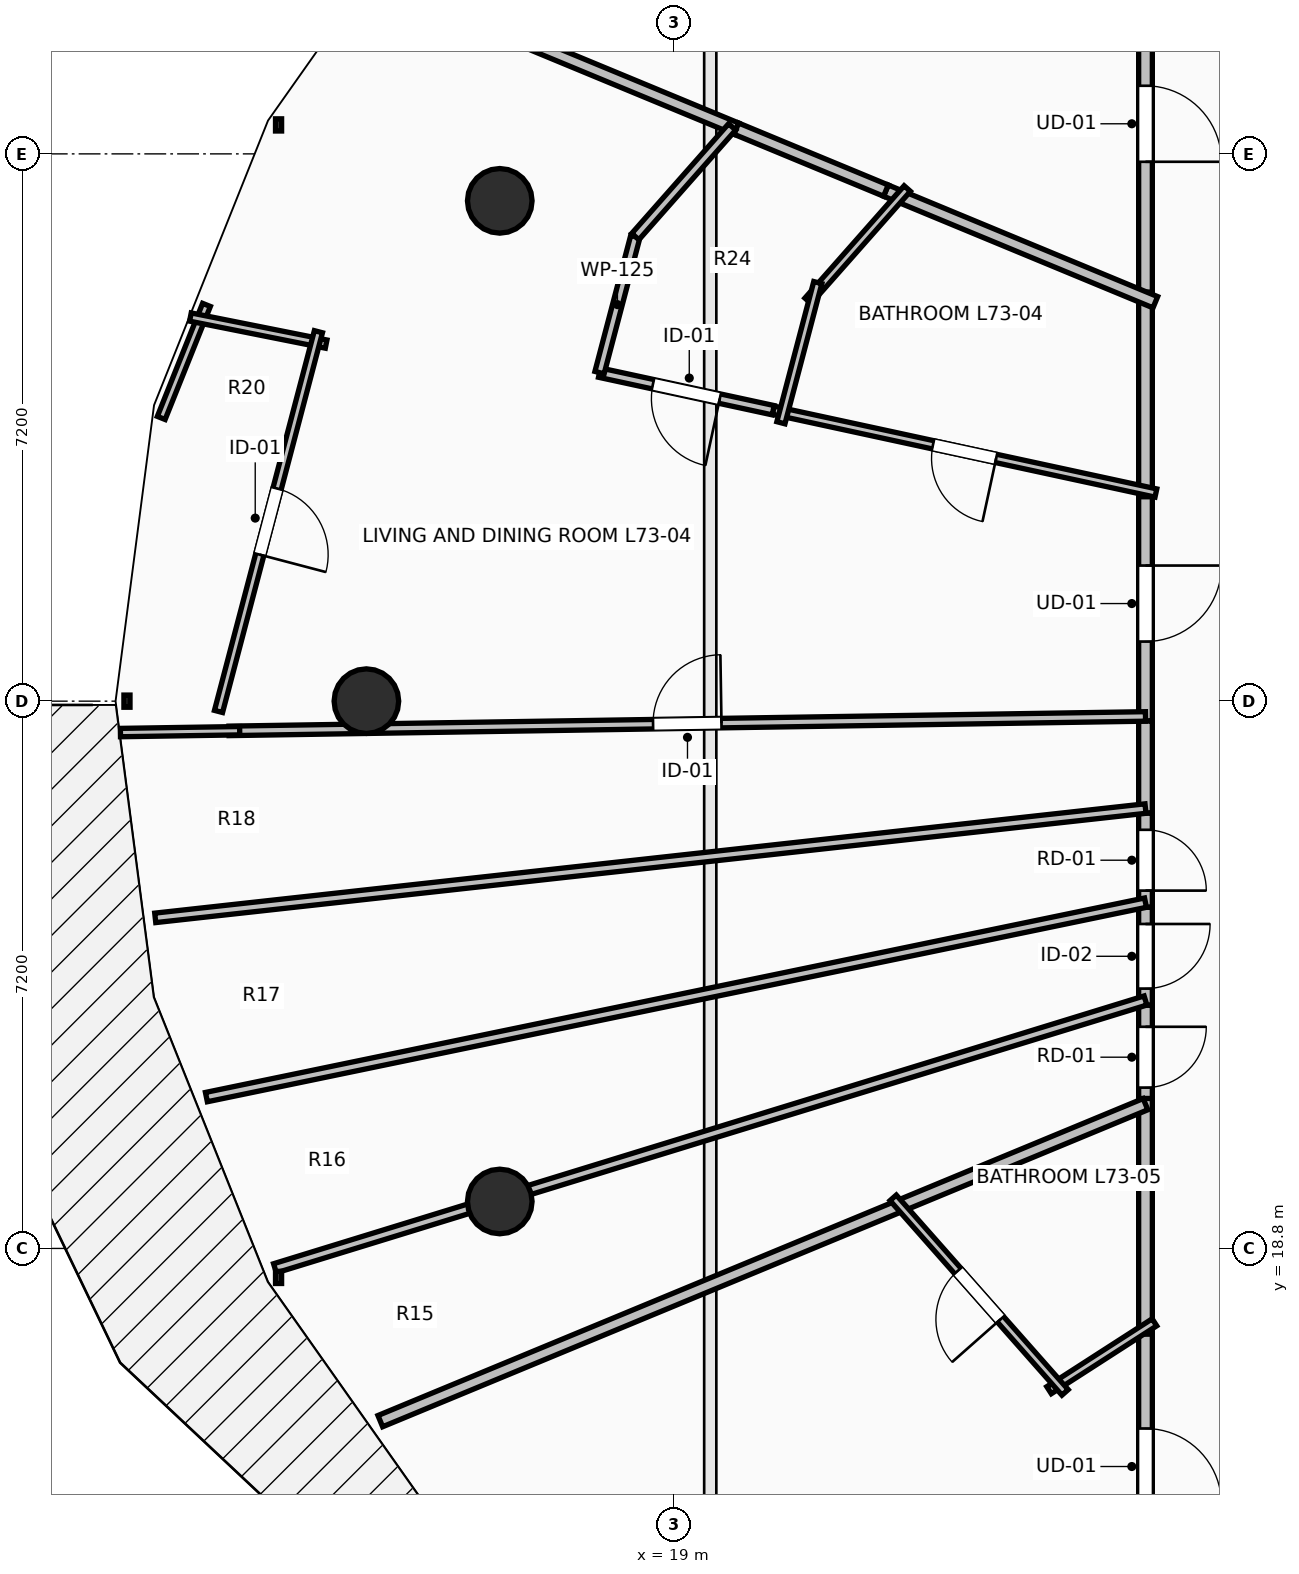
"""IFC4 building model, lengths in metres.
Left out: names, types, materials, properties, quantities, classifications, styles, units other than length and angle.
Written with IfcOpenShell. Run it as: python <this file> out.ifc"""

import sys

from ifc_helpers import new_model, si_unit, direction, frame, frame_2d, origin, origin_2d, place, context, subcontext, project, spatial, rectangle, circle, extrude, element, fill, save


model = new_model("IFC4")
c1 = context("Model", 3, precision=1e-05, world=origin(), true_north=direction((0.0, 1.0)))
c2 = subcontext(c1, "Body", "Model", "MODEL_VIEW")
j1 = project(units=[si_unit("LENGTHUNIT", "METRE"), si_unit("PLANEANGLEUNIT", "RADIAN")], contexts=[c1])
p1 = place(None, origin())
s1 = spatial("IfcSite", under=j1, at=p1, CompositionType="ELEMENT")
p2 = place(p1, origin())
s2 = spatial("IfcBuilding", under=s1, at=p2, CompositionType="ELEMENT")
p3 = place(p2, frame((0.0, 0.0, 269.75)))
s3 = spatial("IfcBuildingStorey", under=s2, at=p3, CompositionType="ELEMENT", Elevation=269.75)
for number, where, z_axis, x_axis in (
    (1, (16.705, 32.582, 0.0), (0.0, 0.0, 1.0), (-0.924, 0.383, 0.0)),
    (2, (14.95, 26.0, 0.0), (0.0, 0.0, 1.0), (-1.0, 0.0, 0.0)),
    (3, (16.705, 19.418, 0.0), (0.0, 0.0, 1.0), (-0.924, -0.383, 0.0)),
):
    element("IfcColumn", number, at=place(p3, frame(where, z_axis=z_axis, x_axis=x_axis)), inside=s3, PredefinedType="COLUMN", context=c2, shape_type="SweptSolid", body=[
        extrude(circle(Radius=0.425, at=origin_2d()), origin(), (0.0, 0.0, 1.0), 3.55),
    ])
p4 = place(p3, frame((25.2, 35.95, 0.0), z_axis=(0.0, 0.0, 1.0), x_axis=(0.0, -1.0, 0.0)))
e4 = element("IfcWall", 4, at=p4, inside=s3, PredefinedType="PARTITIONING", context=c2, shape_type="SweptSolid", body=[
    extrude(rectangle(XDim=4.708, YDim=0.18, at=frame_2d((2.354, 0.0))), origin(), (0.0, 0.0, 1.0), 2.482),
])
p5 = place(p4, frame((1.854, 0.0, 0.0)))
e5 = element("IfcOpeningElement", 5, at=p5, cuts=e4, PredefinedType="OPENING", context=c2, shape_type="SweptSolid", body=[
    extrude(rectangle(XDim=1.0, YDim=2.15, at=frame_2d((0.5, 1.075))), frame((0.0, 0.105, 0.0), z_axis=(0.0, -1.0, 0.0), x_axis=(1.0, 0.0, 0.0)), (0.0, 0.0, 1.0), 0.21),
])
p6 = place(p3, frame((25.2, 28.829, 0.0), z_axis=(0.0, 0.0, 1.0), x_axis=(0.0, -1.0, 0.0)))
e6 = element("IfcWall", 6, at=p6, inside=s3, PredefinedType="PARTITIONING", context=c2, shape_type="SweptSolid", body=[
    extrude(rectangle(XDim=3.09, YDim=0.18, at=frame_2d((1.545, 0.0))), origin(), (0.0, 0.0, 1.0), 2.482),
])
p7 = place(p6, frame((1.045, 0.0, 0.0)))
e7 = element("IfcOpeningElement", 7, at=p7, cuts=e6, PredefinedType="OPENING", context=c2, shape_type="SweptSolid", body=[
    extrude(rectangle(XDim=1.0, YDim=2.15, at=frame_2d((0.5, 1.075))), frame((0.0, 0.105, 0.0), z_axis=(0.0, -1.0, 0.0), x_axis=(1.0, 0.0, 0.0)), (0.0, 0.0, 1.0), 0.21),
])
p8 = place(p3, frame((25.2, 31.382, 0.0), z_axis=(0.0, 0.0, 1.0), x_axis=(0.0, -1.0, 0.0)))
e8 = element("IfcWall", 8, at=p8, inside=s3, PredefinedType="PARTITIONING", context=c2, shape_type="SweptSolid", body=[
    extrude(rectangle(XDim=2.693, YDim=0.18, at=frame_2d((1.347, 0.0))), origin(), (0.0, 0.0, 1.0), 2.482),
])
p9 = place(p3, frame((25.2, 25.739, 0.0), z_axis=(0.0, 0.0, 1.0), x_axis=(0.0, -1.0, 0.0)))
e9 = element("IfcWall", 9, at=p9, inside=s3, PredefinedType="PARTITIONING", context=c2, shape_type="SweptSolid", body=[
    extrude(rectangle(XDim=1.212, YDim=0.18, at=frame_2d((0.606, 0.0))), origin(), (0.0, 0.0, 1.0), 3.29),
])
p10 = place(p3, frame((25.2, 24.527, 0.0), z_axis=(0.0, 0.0, 1.0), x_axis=(0.0, -1.0, 0.0)))
e10 = element("IfcWall", 10, at=p10, inside=s3, PredefinedType="PARTITIONING", context=c2, shape_type="SweptSolid", body=[
    extrude(rectangle(XDim=1.239, YDim=0.18, at=frame_2d((0.62, 0.0))), origin(), (0.0, 0.0, 1.0), 3.29),
])
p11 = place(p10, frame((0.219, 0.0, 0.0)))
e11 = element("IfcOpeningElement", 11, at=p11, cuts=e10, PredefinedType="OPENING", context=c2, shape_type="SweptSolid", body=[
    extrude(rectangle(XDim=0.8, YDim=2.05, at=frame_2d((0.4, 1.025))), frame((0.0, 0.105, 0.0), z_axis=(0.0, -1.0, 0.0), x_axis=(1.0, 0.0, 0.0)), (0.0, 0.0, 1.0), 0.21),
])
p12 = place(p3, frame((25.2, 23.288, 0.0), z_axis=(0.0, 0.0, 1.0), x_axis=(0.0, -1.0, 0.0)))
e12 = element("IfcWall", 12, at=p12, inside=s3, PredefinedType="PARTITIONING", context=c2, shape_type="SweptSolid", body=[
    extrude(rectangle(XDim=1.289, YDim=0.18, at=frame_2d((0.645, 0.0))), origin(), (0.0, 0.0, 1.0), 3.29),
])
p13 = place(p12, frame((0.219, 0.0, 0.0)))
e13 = element("IfcOpeningElement", 13, at=p13, cuts=e12, PredefinedType="OPENING", context=c2, shape_type="SweptSolid", body=[
    extrude(rectangle(XDim=0.85, YDim=2.1, at=frame_2d((0.425, 1.05))), frame((0.0, 0.105, 0.0), z_axis=(0.0, -1.0, 0.0), x_axis=(1.0, 0.0, 0.0)), (0.0, 0.0, 1.0), 0.21),
])
p14 = place(p3, frame((25.2, 21.999, 0.0), z_axis=(0.0, 0.0, 1.0), x_axis=(0.0, -1.0, 0.0)))
e14 = element("IfcWall", 14, at=p14, inside=s3, PredefinedType="PARTITIONING", context=c2, shape_type="SweptSolid", body=[
    extrude(rectangle(XDim=1.366, YDim=0.18, at=frame_2d((0.683, 0.0))), origin(), (0.0, 0.0, 1.0), 3.29),
])
p15 = place(p14, frame((0.283, 0.0, 0.0)))
e15 = element("IfcOpeningElement", 15, at=p15, cuts=e14, PredefinedType="OPENING", context=c2, shape_type="SweptSolid", body=[
    extrude(rectangle(XDim=0.8, YDim=2.05, at=frame_2d((0.4, 1.025))), frame((0.0, 0.105, 0.0), z_axis=(0.0, -1.0, 0.0), x_axis=(1.0, 0.0, 0.0)), (0.0, 0.0, 1.0), 0.21),
])
p16 = place(p3, frame((25.2, 17.812, 0.0), z_axis=(0.0, 0.0, 1.0), x_axis=(0.0, -1.0, 0.0)))
e16 = element("IfcWall", 16, at=p16, inside=s3, PredefinedType="PARTITIONING", context=c2, shape_type="SweptSolid", body=[
    extrude(rectangle(XDim=3.762, YDim=0.18, at=frame_2d((1.881, 0.0))), origin(), (0.0, 0.0, 1.0), 2.482),
])
p17 = place(p16, frame((1.381, 0.0, 0.0)))
e17 = element("IfcOpeningElement", 17, at=p17, cuts=e16, PredefinedType="OPENING", context=c2, shape_type="SweptSolid", body=[
    extrude(rectangle(XDim=1.0, YDim=2.15, at=frame_2d((0.5, 1.075))), frame((0.0, 0.105, 0.0), z_axis=(0.0, -1.0, 0.0), x_axis=(1.0, 0.0, 0.0)), (0.0, 0.0, 1.0), 0.21),
])
p18 = place(p3, frame((25.2, 20.773, 0.0), z_axis=(0.0, 0.0, 1.0), x_axis=(0.0, -1.0, 0.0)))
e18 = element("IfcWall", 18, at=p18, inside=s3, PredefinedType="PARTITIONING", context=c2, shape_type="SweptSolid", body=[
    extrude(rectangle(XDim=3.101, YDim=0.18, at=frame_2d((1.55, 0.0))), origin(), (0.0, 0.0, 1.0), 3.29),
])
p19 = place(p3, frame((16.446, 34.928, 0.0), z_axis=(0.0, 0.0, 1.0), x_axis=(0.923904292622, -0.3826236507, 0.0)))
e19 = element("IfcWall", 19, at=p19, inside=s3, PredefinedType="PARTITIONING", context=c2, shape_type="SweptSolid", body=[
    extrude(rectangle(XDim=3.648, YDim=0.16, at=frame_2d((1.824, 0.0))), origin(), (0.0, 0.0, 1.0), 2.874),
])
p20 = place(p3, frame((21.785, 32.717, 0.0), z_axis=(0.0, 0.0, 1.0), x_axis=(0.923878783617, -0.382685240352, 0.0)))
e20 = element("IfcWall", 20, at=p20, inside=s3, PredefinedType="PARTITIONING", context=c2, shape_type="SweptSolid", body=[
    extrude(rectangle(XDim=3.837, YDim=0.16, at=frame_2d((1.918, 0.0))), origin(), (0.0, 0.0, 1.0), 2.979),
])
p21 = place(p3, frame((19.817, 33.532, 0.0), z_axis=(0.0, 0.0, 1.0), x_axis=(0.92391905869, -0.382587993786, 0.0)))
e21 = element("IfcWall", 21, at=p21, inside=s3, PredefinedType="PARTITIONING", context=c2, shape_type="SweptSolid", body=[
    extrude(rectangle(XDim=2.13, YDim=0.16, at=frame_2d((1.065, 0.0))), origin(), (0.0, 0.0, 1.0), 2.936),
])
p22 = place(p3, frame((25.337, 28.738, 0.0), z_axis=(0.0, 0.0, 1.0), x_axis=(-0.977382932841, 0.211477191656, 0.0)))
e22 = element("IfcWall", 22, at=p22, inside=s3, PredefinedType="PARTITIONING", context=c2, shape_type="SweptSolid", body=[
    extrude(rectangle(XDim=5.151, YDim=0.11, at=frame_2d((2.576, 0.0))), origin(), (0.0, 0.0, 1.0), 2.482),
])
p23 = place(p22, frame((2.15, 0.0, 0.0)))
e23 = element("IfcOpeningElement", 23, at=p23, cuts=e22, PredefinedType="OPENING", context=c2, shape_type="SweptSolid", body=[
    extrude(rectangle(XDim=0.85, YDim=2.1, at=frame_2d((0.425, 1.05))), frame((0.0, 0.07, 0.0), z_axis=(0.0, -1.0, 0.0), x_axis=(1.0, 0.0, 0.0)), (0.0, 0.0, 1.0), 0.14),
])
p24 = place(p3, frame((12.846, 31.213, 0.0), z_axis=(0.0, 0.0, 1.0), x_axis=(-0.371522095559, -0.928424112414, 0.0)))
e24 = element("IfcWall", 24, at=p24, inside=s3, PredefinedType="PARTITIONING", context=c2, shape_type="SweptSolid", body=[
    extrude(rectangle(XDim=1.602, YDim=0.11, at=frame_2d((0.801, 0.0))), origin(), (0.0, 0.0, 1.0), 3.29),
])
p25 = place(p3, frame((12.635, 31.053, 0.0), z_axis=(0.0, 0.0, 1.0), x_axis=(0.980704252003, -0.195497238094, 0.0)))
e25 = element("IfcWall", 25, at=p25, inside=s3, PredefinedType="PARTITIONING", context=c2, shape_type="SweptSolid", body=[
    extrude(rectangle(XDim=1.821, YDim=0.11, at=frame_2d((0.91, 0.0))), origin(), (0.0, 0.0, 1.0), 3.29),
])
p26 = place(p3, frame((14.319, 30.86, 0.0), z_axis=(0.0, 0.0, 1.0), x_axis=(-0.254404898477, -0.967097796312, 0.0)))
e26 = element("IfcWall", 26, at=p26, inside=s3, PredefinedType="PARTITIONING", context=c2, shape_type="SweptSolid", body=[
    extrude(rectangle(XDim=5.166, YDim=0.11, at=frame_2d((2.583, 0.0))), origin(), (0.0, 0.0, 1.0), 3.29),
])
p27 = place(p26, frame((2.133, 0.0, 0.0)))
e27 = element("IfcOpeningElement", 27, at=p27, cuts=e26, PredefinedType="OPENING", context=c2, shape_type="SweptSolid", body=[
    extrude(rectangle(XDim=0.9, YDim=2.1, at=frame_2d((0.45, 1.05))), frame((0.0, 0.07, 0.0), z_axis=(0.0, -1.0, 0.0), x_axis=(1.0, 0.0, 0.0)), (0.0, 0.0, 1.0), 0.14),
])
p28 = place(p3, frame((20.302, 29.828, 0.0), z_axis=(0.0, 0.0, 1.0), x_axis=(-0.977387924942, 0.211454118377, 0.0)))
e28 = element("IfcWall", 28, at=p28, inside=s3, PredefinedType="PARTITIONING", context=c2, shape_type="SweptSolid", body=[
    extrude(rectangle(XDim=2.338, YDim=0.125, at=frame_2d((1.169, 0.0))), origin(), (0.0, 0.0, 1.0), 2.936),
])
p29 = place(p28, frame((0.719, 0.0, 0.0)))
e29 = element("IfcOpeningElement", 29, at=p29, cuts=e28, PredefinedType="OPENING", context=c2, shape_type="SweptSolid", body=[
    extrude(rectangle(XDim=0.9, YDim=2.1, at=frame_2d((0.45, 1.05))), frame((0.0, 0.077, 0.0), z_axis=(0.0, -1.0, 0.0), x_axis=(1.0, 0.0, 0.0)), (0.0, 0.0, 1.0), 0.155),
])
p30 = place(p3, frame((18.017, 30.322, 0.0), z_axis=(0.0, 0.0, 1.0), x_axis=(0.254434866485, 0.967089912426, 0.0)))
e30 = element("IfcWall", 30, at=p30, inside=s3, PredefinedType="PARTITIONING", context=c2, shape_type="SweptSolid", body=[
    extrude(rectangle(XDim=1.851, YDim=0.125, at=frame_2d((0.926, 0.0))), origin(), (0.0, 0.0, 1.0), 2.482),
])
p31 = place(p3, frame((18.488, 32.112, 0.0), z_axis=(0.0, 0.0, 1.0), x_axis=(0.661856531983, 0.749630529709, 0.0)))
e31 = element("IfcWall", 31, at=p31, inside=s3, PredefinedType="PARTITIONING", context=c2, shape_type="SweptSolid", body=[
    extrude(rectangle(XDim=1.925, YDim=0.125, at=frame_2d((0.962, 0.0))), origin(), (0.0, 0.0, 1.0), 2.482),
])
p32 = place(p3, frame((13.143, 25.609, 0.0), z_axis=(0.0, 0.0, 1.0), x_axis=(0.999875613351, 0.015772058374, 0.0)))
e32 = element("IfcWall", 32, at=p32, inside=s3, PredefinedType="PARTITIONING", context=c2, shape_type="SweptSolid", body=[
    extrude(rectangle(XDim=12.058, YDim=0.125, at=frame_2d((6.029, 0.0))), origin(), (0.0, 0.0, 1.0), 2.874),
])
p33 = place(p32, frame((5.579, 0.0, 0.0)))
e33 = element("IfcOpeningElement", 33, at=p33, cuts=e32, PredefinedType="OPENING", context=c2, shape_type="SweptSolid", body=[
    extrude(rectangle(XDim=0.9, YDim=2.1, at=frame_2d((0.45, 1.05))), frame((0.0, 0.077, 0.0), z_axis=(0.0, -1.0, 0.0), x_axis=(1.0, 0.0, 0.0)), (0.0, 0.0, 1.0), 0.155),
])
p34 = place(p3, frame((22.066, 32.744, 0.0), z_axis=(0.0, 0.0, 1.0), x_axis=(-0.662047420969, -0.749461948593, 0.0)))
e34 = element("IfcWall", 34, at=p34, inside=s3, PredefinedType="PARTITIONING", context=c2, shape_type="SweptSolid", body=[
    extrude(rectangle(XDim=1.972, YDim=0.11, at=frame_2d((0.986, 0.0))), origin(), (0.0, 0.0, 1.0), 2.936),
])
p35 = place(p3, frame((20.889, 31.506, 0.0), z_axis=(0.0, 0.0, 1.0), x_axis=(-0.254568935897, -0.967054629727, 0.0)))
e35 = element("IfcWall", 35, at=p35, inside=s3, PredefinedType="PARTITIONING", context=c2, shape_type="SweptSolid", body=[
    extrude(rectangle(XDim=1.906, YDim=0.11, at=frame_2d((0.953, 0.0))), origin(), (0.0, 0.0, 1.0), 2.482),
])
p36 = place(p3, frame((11.714, 25.587, 0.0), z_axis=(0.0, 0.0, 1.0), x_axis=(0.9998813462, 0.015404334465, 0.0)))
e36 = element("IfcWall", 36, at=p36, inside=s3, PredefinedType="PARTITIONING", context=c2, shape_type="SweptSolid", body=[
    extrude(rectangle(XDim=1.569, YDim=0.11, at=frame_2d((0.785, 0.0))), origin(), (0.0, 0.0, 1.0), 3.29),
])
p37 = place(p3, frame((12.172, 23.149, 0.0), z_axis=(0.0, 0.0, 1.0), x_axis=(0.993963433103, 0.109711866515, 0.0)))
e37 = element("IfcWall", 37, at=p37, inside=s3, PredefinedType="PARTITIONING", context=c2, shape_type="SweptSolid", body=[
    extrude(rectangle(XDim=13.107, YDim=0.125, at=frame_2d((6.553, 0.0))), origin(), (0.0, 0.0, 1.0), 2.874),
])
p38 = place(p3, frame((12.845, 20.791, 0.0), z_axis=(0.0, 0.0, 1.0), x_axis=(0.97923049011, 0.202750208975, 0.0)))
e38 = element("IfcWall", 38, at=p38, inside=s3, PredefinedType="PARTITIONING", context=c2, shape_type="SweptSolid", body=[
    extrude(rectangle(XDim=12.617, YDim=0.125, at=frame_2d((6.309, 0.0))), origin(), (0.0, 0.0, 1.0), 2.874),
])
p39 = place(p3, frame((13.747, 18.539, 0.0), z_axis=(0.0, 0.0, 1.0), x_axis=(0.955802794564, 0.294008533725, 0.0)))
e39 = element("IfcWall", 39, at=p39, inside=s3, PredefinedType="PARTITIONING", context=c2, shape_type="SweptSolid", body=[
    extrude(rectangle(XDim=11.982, YDim=0.125, at=frame_2d((5.991, 0.0))), origin(), (0.0, 0.0, 1.0), 2.482),
])
p40 = place(p3, frame((15.133, 16.528, 0.0), z_axis=(0.0, 0.0, 1.0), x_axis=(0.923877013663, 0.382689513347, 0.0)))
e40 = element("IfcWall", 40, at=p40, inside=s3, PredefinedType="PARTITIONING", context=c2, shape_type="SweptSolid", body=[
    extrude(rectangle(XDim=10.896, YDim=0.16, at=frame_2d((5.448, 0.0))), origin(), (0.0, 0.0, 1.0), 2.482),
])
p41 = place(p3, frame((25.318, 17.828, 0.0), z_axis=(0.0, 0.0, 1.0), x_axis=(-0.840783734709, -0.541371140207, 0.0)))
e41 = element("IfcWall", 41, at=p41, inside=s3, PredefinedType="PARTITIONING", context=c2, shape_type="SweptSolid", body=[
    extrude(rectangle(XDim=1.649, YDim=0.11, at=frame_2d((0.824, 0.0))), origin(), (0.0, 0.0, 1.0), 2.482),
])
p42 = place(p3, frame((24.142, 16.906, 0.0), z_axis=(0.0, 0.0, 1.0), x_axis=(-0.662044708061, 0.749464345068, 0.0)))
e42 = element("IfcWall", 42, at=p42, inside=s3, PredefinedType="PARTITIONING", context=c2, shape_type="SweptSolid", body=[
    extrude(rectangle(XDim=3.416, YDim=0.11, at=frame_2d((1.708, 0.0))), origin(), (0.0, 0.0, 1.0), 2.482),
])
p43 = place(p42, frame((1.283, 0.0, 0.0)))
e43 = element("IfcOpeningElement", 43, at=p43, cuts=e42, PredefinedType="OPENING", context=c2, shape_type="SweptSolid", body=[
    extrude(rectangle(XDim=0.85, YDim=2.1, at=frame_2d((0.425, 1.05))), frame((0.0, 0.07, 0.0), z_axis=(0.0, -1.0, 0.0), x_axis=(1.0, 0.0, 0.0)), (0.0, 0.0, 1.0), 0.14),
])
p44 = place(p5, origin())
e44 = element("IfcDoor", 44, at=p44, inside=s3, OperationType="SINGLE_SWING_RIGHT", PredefinedType="DOOR", context=c2, shape_type="SweptSolid", body=[
    extrude(rectangle(XDim=1.0, YDim=2.15, at=frame_2d((0.5, 1.075))), frame((0.0, 0.025, 0.0), z_axis=(0.0, -1.0, 0.0), x_axis=(1.0, 0.0, 0.0)), (0.0, 0.0, 1.0), 0.05),
])
fill(e5, e44)
p45 = place(p7, origin())
e45 = element("IfcDoor", 45, at=p45, inside=s3, OperationType="SINGLE_SWING_LEFT", PredefinedType="DOOR", context=c2, shape_type="SweptSolid", body=[
    extrude(rectangle(XDim=1.0, YDim=2.15, at=frame_2d((0.5, 1.075))), frame((0.0, 0.025, 0.0), z_axis=(0.0, -1.0, 0.0), x_axis=(1.0, 0.0, 0.0)), (0.0, 0.0, 1.0), 0.05),
])
fill(e7, e45)
p46 = place(p17, origin())
e46 = element("IfcDoor", 46, at=p46, inside=s3, OperationType="SINGLE_SWING_RIGHT", PredefinedType="DOOR", context=c2, shape_type="SweptSolid", body=[
    extrude(rectangle(XDim=1.0, YDim=2.15, at=frame_2d((0.5, 1.075))), frame((0.0, 0.025, 0.0), z_axis=(0.0, -1.0, 0.0), x_axis=(1.0, 0.0, 0.0)), (0.0, 0.0, 1.0), 0.05),
])
fill(e17, e46)
p47 = place(p23, origin())
e47 = element("IfcDoor", 47, at=p47, inside=s3, OperationType="SINGLE_SWING_LEFT", PredefinedType="DOOR", context=c2, shape_type="SweptSolid", body=[
    extrude(rectangle(XDim=0.85, YDim=2.1, at=frame_2d((0.425, 1.05))), frame((0.0, 0.025, 0.0), z_axis=(0.0, -1.0, 0.0), x_axis=(1.0, 0.0, 0.0)), (0.0, 0.0, 1.0), 0.05),
])
fill(e23, e47)
p48 = place(p27, origin())
e48 = element("IfcDoor", 48, at=p48, inside=s3, OperationType="SINGLE_SWING_RIGHT", PredefinedType="DOOR", context=c2, shape_type="SweptSolid", body=[
    extrude(rectangle(XDim=0.9, YDim=2.1, at=frame_2d((0.45, 1.05))), frame((0.0, 0.025, 0.0), z_axis=(0.0, -1.0, 0.0), x_axis=(1.0, 0.0, 0.0)), (0.0, 0.0, 1.0), 0.05),
])
fill(e27, e48)
p49 = place(p29, origin())
e49 = element("IfcDoor", 49, at=p49, inside=s3, OperationType="SINGLE_SWING_LEFT", PredefinedType="DOOR", context=c2, shape_type="SweptSolid", body=[
    extrude(rectangle(XDim=0.9, YDim=2.1, at=frame_2d((0.45, 1.05))), frame((0.0, 0.025, 0.0), z_axis=(0.0, -1.0, 0.0), x_axis=(1.0, 0.0, 0.0)), (0.0, 0.0, 1.0), 0.05),
])
fill(e29, e49)
p50 = place(p33, origin())
e50 = element("IfcDoor", 50, at=p50, inside=s3, OperationType="SINGLE_SWING_RIGHT", PredefinedType="DOOR", context=c2, shape_type="SweptSolid", body=[
    extrude(rectangle(XDim=0.9, YDim=2.1, at=frame_2d((0.45, 1.05))), frame((0.0, 0.025, 0.0), z_axis=(0.0, -1.0, 0.0), x_axis=(1.0, 0.0, 0.0)), (0.0, 0.0, 1.0), 0.05),
])
fill(e33, e50)
p51 = place(p43, origin())
e51 = element("IfcDoor", 51, at=p51, inside=s3, OperationType="SINGLE_SWING_LEFT", PredefinedType="DOOR", context=c2, shape_type="SweptSolid", body=[
    extrude(rectangle(XDim=0.85, YDim=2.1, at=frame_2d((0.425, 1.05))), frame((0.0, 0.025, 0.0), z_axis=(0.0, -1.0, 0.0), x_axis=(1.0, 0.0, 0.0)), (0.0, 0.0, 1.0), 0.05),
])
fill(e43, e51)
p52 = place(p11, origin())
e52 = element("IfcDoor", 52, at=p52, inside=s3, OperationType="SINGLE_SWING_RIGHT", PredefinedType="DOOR", context=c2, shape_type="SweptSolid", body=[
    extrude(rectangle(XDim=0.8, YDim=2.05, at=frame_2d((0.4, 1.025))), frame((0.0, 0.025, 0.0), z_axis=(0.0, -1.0, 0.0), x_axis=(1.0, 0.0, 0.0)), (0.0, 0.0, 1.0), 0.05),
])
fill(e11, e52)
p53 = place(p13, origin())
e53 = element("IfcDoor", 53, at=p53, inside=s3, OperationType="SINGLE_SWING_LEFT", PredefinedType="DOOR", context=c2, shape_type="SweptSolid", body=[
    extrude(rectangle(XDim=0.85, YDim=2.1, at=frame_2d((0.425, 1.05))), frame((0.0, 0.025, 0.0), z_axis=(0.0, -1.0, 0.0), x_axis=(1.0, 0.0, 0.0)), (0.0, 0.0, 1.0), 0.05),
])
fill(e13, e53)
p54 = place(p15, origin())
e54 = element("IfcDoor", 54, at=p54, inside=s3, OperationType="SINGLE_SWING_LEFT", PredefinedType="DOOR", context=c2, shape_type="SweptSolid", body=[
    extrude(rectangle(XDim=0.8, YDim=2.05, at=frame_2d((0.4, 1.025))), frame((0.0, 0.025, 0.0), z_axis=(0.0, -1.0, 0.0), x_axis=(1.0, 0.0, 0.0)), (0.0, 0.0, 1.0), 0.05),
])
fill(e15, e54)
save(model, sys.argv[1])
